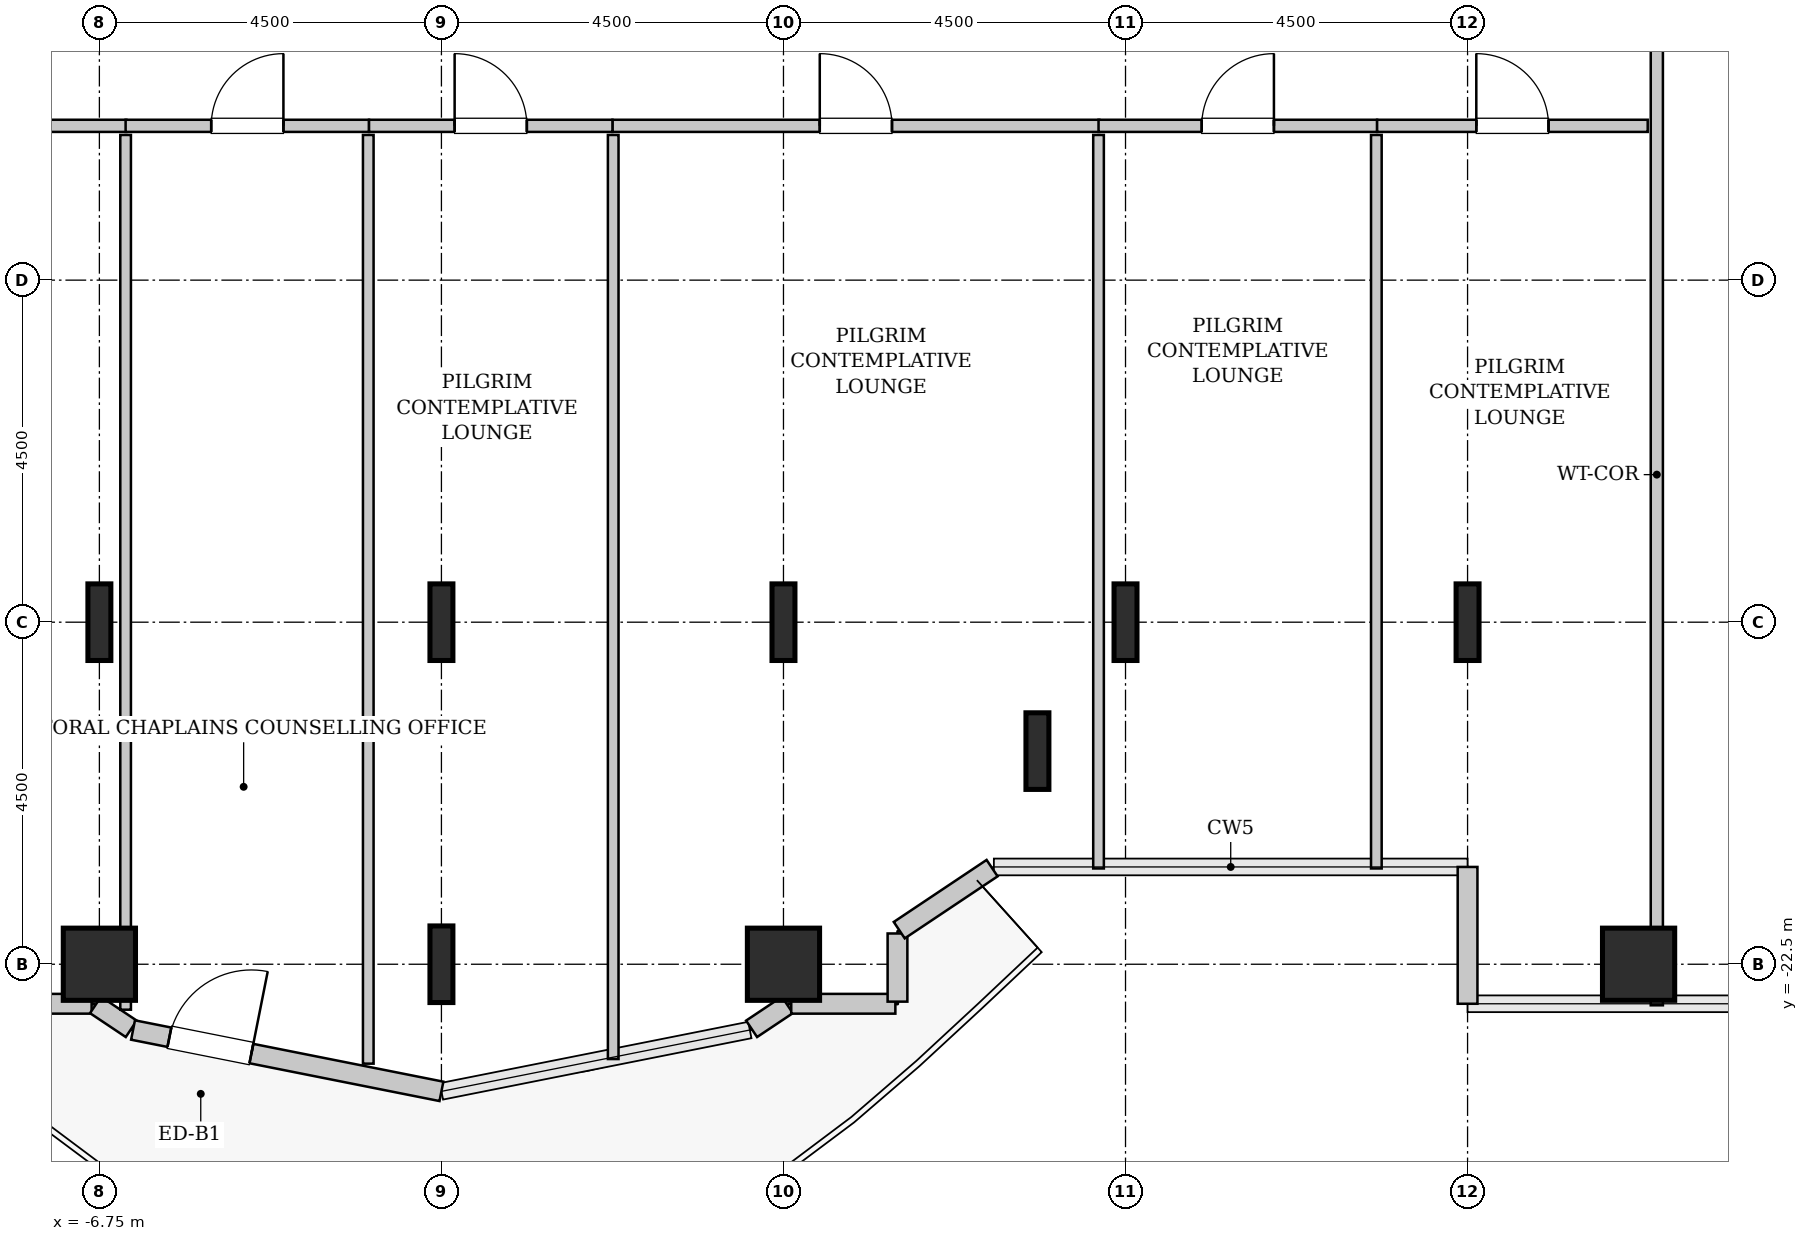
"""IFC4 building model, lengths in metres.
Left out: names, types, materials, properties, quantities, classifications, styles, units other than length and angle.
Written with IfcOpenShell. Run it as: python <this file> out.ifc"""

import sys

from ifc_helpers import new_model, si_unit, direction, frame, frame_2d, origin, origin_2d, place, context, subcontext, project, spatial, rectangle, hollow_rectangle, i_section, extrude, source, transform, mapped, element, fill, save


model = new_model("IFC4")
c1 = context("Model", 3, precision=1e-05, world=origin(), true_north=direction((0.0, 1.0)))
c2 = subcontext(c1, "Body", "Model", "MODEL_VIEW")
j1 = project(units=[si_unit("LENGTHUNIT", "METRE"), si_unit("PLANEANGLEUNIT", "RADIAN")], contexts=[c1])
p1 = place(None, origin())
s1 = spatial("IfcSite", under=j1, at=p1, CompositionType="ELEMENT")
p2 = place(p1, origin())
s2 = spatial("IfcBuilding", under=s1, at=p2, CompositionType="ELEMENT")
p3 = place(p2, frame((0.0, 0.0, 67.2)))
s3 = spatial("IfcBuildingStorey", under=s2, at=p3, CompositionType="ELEMENT", Elevation=67.2)
m1 = source(origin(), c2, "Body", "SweptSolid", [
    extrude(hollow_rectangle(XDim=0.95, YDim=0.95, WallThickness=0.045, InnerFilletRadius=0.045, OuterFilletRadius=0.09, at=origin_2d()), origin(), (0.0, 0.0, 1.0), 3.8),
])
p4 = place(p3, frame((-6.75, -22.5, 0.0), z_axis=(0.0, 0.0, 1.0), x_axis=(1.0, 0.0, 0.0)))
e1 = element("IfcColumn", 1, at=p4, inside=s3, PredefinedType="COLUMN", context=c2, shape_type="MappedRepresentation", body=[
    mapped(m1, transform((0.0, 0.0, 0.0), x_axis=(1.0, 0.0, 0.0), y_axis=(0.0, 1.0, 0.0), z_axis=(0.0, 0.0, 1.0), scale=1.0)),
])
m2 = source(origin(), c2, "Body", "SweptSolid", [
    extrude(i_section(OverallWidth=0.302, OverallDepth=1.008, WebThickness=0.021, FlangeThickness=0.04, FilletRadius=0.03, at=origin_2d()), origin(), (0.0, 0.0, 1.0), 3.8),
])
for number, where, z_axis, x_axis in (
    (2, (-6.75, -18.0, 0.0), (0.0, 0.0, 1.0), (1.0, 0.0, 0.0)),
    (3, (-2.25, -22.5, 0.0), (0.0, 0.0, 1.0), (1.0, 0.0, 0.0)),
    (4, (-2.25, -18.0, 0.0), (0.0, 0.0, 1.0), (1.0, 0.0, 0.0)),
):
    element("IfcColumn", number, at=place(p3, frame(where, z_axis=z_axis, x_axis=x_axis)), inside=s3, PredefinedType="COLUMN", context=c2, shape_type="MappedRepresentation", body=[
        mapped(m2, transform((0.0, 0.0, 0.0), x_axis=(1.0, 0.0, 0.0), y_axis=(0.0, 1.0, 0.0), z_axis=(0.0, 0.0, 1.0), scale=1.0)),
    ])
p5 = place(p3, frame((2.25, -22.5, 0.0), z_axis=(0.0, 0.0, 1.0), x_axis=(1.0, 0.0, 0.0)))
e5 = element("IfcColumn", 5, at=p5, inside=s3, PredefinedType="COLUMN", context=c2, shape_type="MappedRepresentation", body=[
    mapped(m1, transform((0.0, 0.0, 0.0), x_axis=(1.0, 0.0, 0.0), y_axis=(0.0, 1.0, 0.0), z_axis=(0.0, 0.0, 1.0), scale=1.0)),
])
for number, where, z_axis, x_axis in (
    (6, (2.25, -18.0, 0.0), (0.0, 0.0, 1.0), (1.0, 0.0, 0.0)),
    (7, (5.591, -19.696, 0.0), (0.0, 0.0, 1.0), (1.0, 0.0, 0.0)),
    (8, (6.75, -18.0, 0.0), (0.0, 0.0, 1.0), (1.0, 0.0, 0.0)),
    (9, (11.25, -18.0, 0.0), (0.0, 0.0, 1.0), (1.0, 0.0, 0.0)),
):
    element("IfcColumn", number, at=place(p3, frame(where, z_axis=z_axis, x_axis=x_axis)), inside=s3, PredefinedType="COLUMN", context=c2, shape_type="MappedRepresentation", body=[
        mapped(m2, transform((0.0, 0.0, 0.0), x_axis=(1.0, 0.0, 0.0), y_axis=(0.0, 1.0, 0.0), z_axis=(0.0, 0.0, 1.0), scale=1.0)),
    ])
p6 = place(p3, frame((13.5, -22.5, 0.0), z_axis=(0.0, 0.0, 1.0), x_axis=(1.0, 0.0, 0.0)))
e10 = element("IfcColumn", 10, at=p6, inside=s3, PredefinedType="COLUMN", context=c2, shape_type="MappedRepresentation", body=[
    mapped(m1, transform((0.0, 0.0, 0.0), x_axis=(1.0, 0.0, 0.0), y_axis=(0.0, 1.0, 0.0), z_axis=(0.0, 0.0, 1.0), scale=1.0)),
])
m3 = source(origin(), c2, "Body", "SweptSolid", [
    extrude(rectangle(XDim=1.8, YDim=0.26, at=frame_2d((0.9, 0.0))), origin(), (0.0, 0.0, 1.0), 3.55),
])
p7 = place(p3, frame((11.25, -21.22, 0.0), z_axis=(0.0, 0.0, 1.0), x_axis=(0.0, -1.0, 0.0)))
e11 = element("IfcWall", 11, at=p7, inside=s3, PredefinedType="SOLIDWALL", context=c2, shape_type="MappedRepresentation", body=[
    mapped(m3, transform((0.0, 0.0, 0.0), x_axis=(1.0, 0.0, 0.0), y_axis=(0.0, 1.0, 0.0), z_axis=(0.0, 0.0, 1.0), scale=1.0)),
])
m4 = source(origin(), c2, "Body", "SweptSolid", [
    extrude(rectangle(XDim=1.37, YDim=0.26, at=frame_2d((0.685, 0.0))), origin(), (0.0, 0.0, 1.0), 3.55),
])
p8 = place(p3, frame((-8.222, -23.02, 0.0), z_axis=(0.0, 0.0, 1.0), x_axis=(1.0, 0.0, 0.0)))
e12 = element("IfcWall", 12, at=p8, inside=s3, PredefinedType="SOLIDWALL", context=c2, shape_type="MappedRepresentation", body=[
    mapped(m4, transform((0.0, 0.0, 0.0), x_axis=(1.0, 0.0, 0.0), y_axis=(0.0, 1.0, 0.0), z_axis=(0.0, 0.0, 1.0), scale=1.0)),
])
m5 = source(origin(), c2, "Body", "SweptSolid", [
    extrude(rectangle(XDim=0.565, YDim=0.26, at=frame_2d((0.283, 0.0))), origin(), (0.0, 0.0, 1.0), 3.55),
])
p9 = place(p3, frame((-6.801, -23.036, 0.0), z_axis=(0.0, 0.0, 1.0), x_axis=(0.831651492666, -0.555297933317, 0.0)))
e13 = element("IfcWall", 13, at=p9, inside=s3, PredefinedType="SOLIDWALL", context=c2, shape_type="MappedRepresentation", body=[
    mapped(m5, transform((0.0, 0.0, 0.0), x_axis=(1.0, 0.0, 0.0), y_axis=(0.0, 1.0, 0.0), z_axis=(0.0, 0.0, 1.0), scale=1.0)),
])
m6 = source(origin(), c2, "Body", "SweptSolid", [
    extrude(rectangle(XDim=4.137, YDim=0.26, at=frame_2d((2.068, 0.0))), origin(), (0.0, 0.0, 1.0), 3.55),
])
p10 = place(p3, frame((-6.307, -23.365, 0.0), z_axis=(0.0, 0.0, 1.0), x_axis=(0.980782170794, -0.195105954428, 0.0)))
e14 = element("IfcWall", 14, at=p10, inside=s3, PredefinedType="SOLIDWALL", context=c2, shape_type="MappedRepresentation", body=[
    mapped(m6, transform((0.0, 0.0, 0.0), x_axis=(1.0, 0.0, 0.0), y_axis=(0.0, 1.0, 0.0), z_axis=(0.0, 0.0, 1.0), scale=1.0)),
])
p11 = place(p10, frame((0.488, 0.0, 0.0)))
e15 = element("IfcOpeningElement", 15, at=p11, cuts=e14, PredefinedType="OPENING", context=c2, shape_type="SweptSolid", body=[
    extrude(rectangle(XDim=1.1, YDim=2.2, at=frame_2d((0.55, 1.1))), frame((0.0, 0.14, 0.0), z_axis=(0.0, -1.0, 0.0), x_axis=(1.0, 0.0, 0.0)), (0.0, 0.0, 1.0), 0.28),
])
p12 = place(p3, frame((1.831, -23.35, 0.0), z_axis=(0.0, 0.0, 1.0), x_axis=(0.831651492666, 0.555297933317, 0.0)))
e16 = element("IfcWall", 16, at=p12, inside=s3, PredefinedType="SOLIDWALL", context=c2, shape_type="MappedRepresentation", body=[
    mapped(m5, transform((0.0, 0.0, 0.0), x_axis=(1.0, 0.0, 0.0), y_axis=(0.0, 1.0, 0.0), z_axis=(0.0, 0.0, 1.0), scale=1.0)),
])
p13 = place(p3, frame((2.352, -23.02, 0.0), z_axis=(0.0, 0.0, 1.0), x_axis=(1.0, 0.0, 0.0)))
e17 = element("IfcWall", 17, at=p13, inside=s3, PredefinedType="SOLIDWALL", context=c2, shape_type="MappedRepresentation", body=[
    mapped(m4, transform((0.0, 0.0, 0.0), x_axis=(1.0, 0.0, 0.0), y_axis=(0.0, 1.0, 0.0), z_axis=(0.0, 0.0, 1.0), scale=1.0)),
])
m7 = source(origin(), c2, "Body", "SweptSolid", [
    extrude(rectangle(XDim=0.897, YDim=0.26, at=frame_2d((0.448, 0.0))), origin(), (0.0, 0.0, 1.0), 3.55),
])
p14 = place(p3, frame((3.75, -22.992, 0.0), z_axis=(0.0, 0.0, 1.0), x_axis=(0.0, 1.0, 0.0)))
e18 = element("IfcWall", 18, at=p14, inside=s3, PredefinedType="SOLIDWALL", context=c2, shape_type="MappedRepresentation", body=[
    mapped(m7, transform((0.0, 0.0, 0.0), x_axis=(1.0, 0.0, 0.0), y_axis=(0.0, 1.0, 0.0), z_axis=(0.0, 0.0, 1.0), scale=1.0)),
])
m8 = source(origin(), c2, "Body", "SweptSolid", [
    extrude(rectangle(XDim=1.469, YDim=0.26, at=frame_2d((0.734, 0.0))), origin(), (0.0, 0.0, 1.0), 3.55),
])
p15 = place(p3, frame((3.773, -22.052, 0.0), z_axis=(0.0, 0.0, 1.0), x_axis=(0.831461760506, 0.555581983884, 0.0)))
e19 = element("IfcWall", 19, at=p15, inside=s3, PredefinedType="SOLIDWALL", context=c2, shape_type="MappedRepresentation", body=[
    mapped(m8, transform((0.0, 0.0, 0.0), x_axis=(1.0, 0.0, 0.0), y_axis=(0.0, 1.0, 0.0), z_axis=(0.0, 0.0, 1.0), scale=1.0)),
])
m9 = source(origin(), c2, "Body", "SweptSolid", [
    extrude(rectangle(XDim=17.245, YDim=0.16, at=frame_2d((8.623, 0.0))), origin(), (0.0, 0.0, 1.0), 3.535),
])
p16 = place(p3, frame((13.74, -23.04, 0.0), z_axis=(0.0, 0.0, 1.0), x_axis=(0.0, 1.0, 0.0)))
e20 = element("IfcWall", 20, at=p16, inside=s3, PredefinedType="PARTITIONING", context=c2, shape_type="MappedRepresentation", body=[
    mapped(m9, transform((0.0, 0.0, 0.0), x_axis=(1.0, 0.0, 0.0), y_axis=(0.0, 1.0, 0.0), z_axis=(0.0, 0.0, 1.0), scale=1.0)),
])
p17 = place(p16, frame((13.913, 0.0, 0.0)))
e21 = element("IfcOpeningElement", 21, at=p17, cuts=e20, PredefinedType="OPENING", context=c2, shape_type="SweptSolid", body=[
    extrude(rectangle(XDim=0.95, YDim=2.1, at=frame_2d((0.475, 1.05))), frame((0.0, 0.09, 0.0), z_axis=(0.0, -1.0, 0.0), x_axis=(1.0, 0.0, 0.0)), (0.0, 0.0, 1.0), 0.18),
])
m10 = source(origin(), c2, "Body", "SweptSolid", [
    extrude(rectangle(XDim=7.225, YDim=0.16, at=frame_2d((3.613, 0.0))), origin(), (0.0, 0.0, 1.0), 3.535),
])
p18 = place(p3, frame((-13.62, -11.47, 0.0), z_axis=(0.0, 0.0, 1.0), x_axis=(1.0, 0.0, 0.0)))
e22 = element("IfcWall", 22, at=p18, inside=s3, PredefinedType="PARTITIONING", context=c2, shape_type="MappedRepresentation", body=[
    mapped(m10, transform((0.0, 0.0, 0.0), x_axis=(1.0, 0.0, 0.0), y_axis=(0.0, 1.0, 0.0), z_axis=(0.0, 0.0, 1.0), scale=1.0)),
])
p19 = place(p18, frame((3.137, 0.0, 0.0)))
e23 = element("IfcOpeningElement", 23, at=p19, cuts=e22, PredefinedType="OPENING", context=c2, shape_type="SweptSolid", body=[
    extrude(rectangle(XDim=0.95, YDim=2.1, at=frame_2d((0.475, 1.05))), frame((0.0, 0.09, 0.0), z_axis=(0.0, -1.0, 0.0), x_axis=(1.0, 0.0, 0.0)), (0.0, 0.0, 1.0), 0.18),
])
m11 = source(origin(), c2, "Body", "SweptSolid", [
    extrude(rectangle(XDim=11.508, YDim=0.14, at=frame_2d((5.754, 0.0))), origin(), (0.0, 0.0, 1.0), 2.825),
])
p20 = place(p3, frame((-6.405, -23.098, 0.0), z_axis=(0.0, 0.0, 1.0), x_axis=(0.0, 1.0, 0.0)))
e24 = element("IfcWall", 24, at=p20, inside=s3, PredefinedType="PARTITIONING", context=c2, shape_type="MappedRepresentation", body=[
    mapped(m11, transform((0.0, 0.0, 0.0), x_axis=(1.0, 0.0, 0.0), y_axis=(0.0, 1.0, 0.0), z_axis=(0.0, 0.0, 1.0), scale=1.0)),
])
m12 = source(origin(), c2, "Body", "SweptSolid", [
    extrude(rectangle(XDim=6.405, YDim=0.16, at=frame_2d((3.203, 0.0))), origin(), (0.0, 0.0, 1.0), 3.535),
])
p21 = place(p3, frame((0.0, -11.47, 0.0), z_axis=(0.0, 0.0, 1.0), x_axis=(1.0, 0.0, 0.0)))
e25 = element("IfcWall", 25, at=p21, inside=s3, PredefinedType="PARTITIONING", context=c2, shape_type="MappedRepresentation", body=[
    mapped(m12, transform((0.0, 0.0, 0.0), x_axis=(1.0, 0.0, 0.0), y_axis=(0.0, 1.0, 0.0), z_axis=(0.0, 0.0, 1.0), scale=1.0)),
])
p22 = place(p21, frame((2.728, 0.0, 0.0)))
e26 = element("IfcOpeningElement", 26, at=p22, cuts=e25, PredefinedType="OPENING", context=c2, shape_type="SweptSolid", body=[
    extrude(rectangle(XDim=0.95, YDim=2.1, at=frame_2d((0.475, 1.05))), frame((0.0, 0.09, 0.0), z_axis=(0.0, -1.0, 0.0), x_axis=(1.0, 0.0, 0.0)), (0.0, 0.0, 1.0), 0.18),
])
m13 = source(origin(), c2, "Body", "SweptSolid", [
    extrude(rectangle(XDim=12.157, YDim=0.14, at=frame_2d((6.079, 0.0))), origin(), (0.0, 0.0, 1.0), 3.535),
])
p23 = place(p3, frame((0.01, -23.747, 0.0), z_axis=(0.0, 0.0, 1.0), x_axis=(0.0, 1.0, 0.0)))
e27 = element("IfcWall", 27, at=p23, inside=s3, PredefinedType="PARTITIONING", context=c2, shape_type="MappedRepresentation", body=[
    mapped(m13, transform((0.0, 0.0, 0.0), x_axis=(1.0, 0.0, 0.0), y_axis=(0.0, 1.0, 0.0), z_axis=(0.0, 0.0, 1.0), scale=1.0)),
])
m14 = source(origin(), c2, "Body", "SweptSolid", [
    extrude(rectangle(XDim=9.65, YDim=0.14, at=frame_2d((4.825, 0.0))), origin(), (0.0, 0.0, 1.0), 3.535),
])
p24 = place(p3, frame((6.395, -21.24, 0.0), z_axis=(0.0, 0.0, 1.0), x_axis=(0.0, 1.0, 0.0)))
e28 = element("IfcWall", 28, at=p24, inside=s3, PredefinedType="PARTITIONING", context=c2, shape_type="MappedRepresentation", body=[
    mapped(m14, transform((0.0, 0.0, 0.0), x_axis=(1.0, 0.0, 0.0), y_axis=(0.0, 1.0, 0.0), z_axis=(0.0, 0.0, 1.0), scale=1.0)),
])
m15 = source(origin(), c2, "Body", "SweptSolid", [
    extrude(rectangle(XDim=3.203, YDim=0.16, at=frame_2d((1.601, 0.0))), origin(), (0.0, 0.0, 1.0), 3.535),
])
p25 = place(p3, frame((-6.405, -11.47, 0.0), z_axis=(0.0, 0.0, 1.0), x_axis=(1.0, 0.0, 0.0)))
e29 = element("IfcWall", 29, at=p25, inside=s3, PredefinedType="PARTITIONING", context=c2, shape_type="MappedRepresentation", body=[
    mapped(m15, transform((0.0, 0.0, 0.0), x_axis=(1.0, 0.0, 0.0), y_axis=(0.0, 1.0, 0.0), z_axis=(0.0, 0.0, 1.0), scale=1.0)),
])
p26 = place(p25, frame((1.126, 0.0, 0.0)))
e30 = element("IfcOpeningElement", 30, at=p26, cuts=e29, PredefinedType="OPENING", context=c2, shape_type="SweptSolid", body=[
    extrude(rectangle(XDim=0.95, YDim=2.1, at=frame_2d((0.475, 1.05))), frame((0.0, 0.09, 0.0), z_axis=(0.0, -1.0, 0.0), x_axis=(1.0, 0.0, 0.0)), (0.0, 0.0, 1.0), 0.18),
])
m16 = source(origin(), c2, "Body", "SweptSolid", [
    extrude(rectangle(XDim=12.218, YDim=0.14, at=frame_2d((6.109, 0.0))), origin(), (0.0, 0.0, 1.0), 3.535),
])
p27 = place(p3, frame((-3.212, -23.808, 0.0), z_axis=(0.0, 0.0, 1.0), x_axis=(0.0, 1.0, 0.0)))
e31 = element("IfcWall", 31, at=p27, inside=s3, PredefinedType="PARTITIONING", context=c2, shape_type="MappedRepresentation", body=[
    mapped(m16, transform((0.0, 0.0, 0.0), x_axis=(1.0, 0.0, 0.0), y_axis=(0.0, 1.0, 0.0), z_axis=(0.0, 0.0, 1.0), scale=1.0)),
])
m17 = source(origin(), c2, "Body", "SweptSolid", [
    extrude(rectangle(XDim=3.202, YDim=0.16, at=frame_2d((1.601, 0.0))), origin(), (0.0, 0.0, 1.0), 3.535),
])
p28 = place(p3, frame((-3.202, -11.47, 0.0), z_axis=(0.0, 0.0, 1.0), x_axis=(1.0, 0.0, 0.0)))
e32 = element("IfcWall", 32, at=p28, inside=s3, PredefinedType="PARTITIONING", context=c2, shape_type="MappedRepresentation", body=[
    mapped(m17, transform((0.0, 0.0, 0.0), x_axis=(1.0, 0.0, 0.0), y_axis=(0.0, 1.0, 0.0), z_axis=(0.0, 0.0, 1.0), scale=1.0)),
])
p29 = place(p28, frame((1.126, 0.0, 0.0)))
e33 = element("IfcOpeningElement", 33, at=p29, cuts=e32, PredefinedType="OPENING", context=c2, shape_type="SweptSolid", body=[
    extrude(rectangle(XDim=0.95, YDim=2.1, at=frame_2d((0.475, 1.05))), frame((0.0, 0.09, 0.0), z_axis=(0.0, -1.0, 0.0), x_axis=(1.0, 0.0, 0.0)), (0.0, 0.0, 1.0), 0.18),
])
m18 = source(origin(), c2, "Body", "SweptSolid", [
    extrude(rectangle(XDim=3.665, YDim=0.16, at=frame_2d((1.833, 0.0))), origin(), (0.0, 0.0, 1.0), 3.535),
])
p30 = place(p3, frame((6.395, -11.47, 0.0), z_axis=(0.0, 0.0, 1.0), x_axis=(1.0, 0.0, 0.0)))
e34 = element("IfcWall", 34, at=p30, inside=s3, PredefinedType="PARTITIONING", context=c2, shape_type="MappedRepresentation", body=[
    mapped(m18, transform((0.0, 0.0, 0.0), x_axis=(1.0, 0.0, 0.0), y_axis=(0.0, 1.0, 0.0), z_axis=(0.0, 0.0, 1.0), scale=1.0)),
])
p31 = place(p30, frame((1.357, 0.0, 0.0)))
e35 = element("IfcOpeningElement", 35, at=p31, cuts=e34, PredefinedType="OPENING", context=c2, shape_type="SweptSolid", body=[
    extrude(rectangle(XDim=0.95, YDim=2.1, at=frame_2d((0.475, 1.05))), frame((0.0, 0.09, 0.0), z_axis=(0.0, -1.0, 0.0), x_axis=(1.0, 0.0, 0.0)), (0.0, 0.0, 1.0), 0.18),
])
p32 = place(p3, frame((10.05, -21.24, 0.0), z_axis=(0.0, 0.0, 1.0), x_axis=(0.0, 1.0, 0.0)))
e36 = element("IfcWall", 36, at=p32, inside=s3, PredefinedType="PARTITIONING", context=c2, shape_type="MappedRepresentation", body=[
    mapped(m14, transform((0.0, 0.0, 0.0), x_axis=(1.0, 0.0, 0.0), y_axis=(0.0, 1.0, 0.0), z_axis=(0.0, 0.0, 1.0), scale=1.0)),
])
m19 = source(origin(), c2, "Body", "SweptSolid", [
    extrude(rectangle(XDim=3.56, YDim=0.16, at=frame_2d((1.78, 0.0))), origin(), (0.0, 0.0, 1.0), 3.535),
])
p33 = place(p3, frame((10.06, -11.47, 0.0), z_axis=(0.0, 0.0, 1.0), x_axis=(1.0, 0.0, 0.0)))
e37 = element("IfcWall", 37, at=p33, inside=s3, PredefinedType="PARTITIONING", context=c2, shape_type="MappedRepresentation", body=[
    mapped(m19, transform((0.0, 0.0, 0.0), x_axis=(1.0, 0.0, 0.0), y_axis=(0.0, 1.0, 0.0), z_axis=(0.0, 0.0, 1.0), scale=1.0)),
])
p34 = place(p33, frame((1.305, 0.0, 0.0)))
e38 = element("IfcOpeningElement", 38, at=p34, cuts=e37, PredefinedType="OPENING", context=c2, shape_type="SweptSolid", body=[
    extrude(rectangle(XDim=0.95, YDim=2.1, at=frame_2d((0.475, 1.05))), frame((0.0, 0.09, 0.0), z_axis=(0.0, -1.0, 0.0), x_axis=(1.0, 0.0, 0.0)), (0.0, 0.0, 1.0), 0.18),
])
m20 = source(origin(), c2, "Body", "SweptSolid", [
    extrude(rectangle(XDim=1.1, YDim=2.2, at=frame_2d((0.55, 1.1))), frame((0.0, 0.025, 0.0), z_axis=(0.0, -1.0, 0.0), x_axis=(1.0, 0.0, 0.0)), (0.0, 0.0, 1.0), 0.05),
])
p35 = place(p11, origin())
e39 = element("IfcDoor", 39, at=p35, inside=s3, OperationType="SINGLE_SWING_RIGHT", PredefinedType="DOOR", context=c2, shape_type="MappedRepresentation", body=[
    mapped(m20, transform((0.0, 0.0, 0.0), x_axis=(1.0, 0.0, 0.0), y_axis=(0.0, 1.0, 0.0), z_axis=(0.0, 0.0, 1.0), scale=1.0)),
])
fill(e15, e39)
m21 = source(origin(), c2, "Body", "SweptSolid", [
    extrude(rectangle(XDim=0.95, YDim=2.1, at=frame_2d((0.475, 1.05))), frame((0.0, 0.025, 0.0), z_axis=(0.0, -1.0, 0.0), x_axis=(1.0, 0.0, 0.0)), (0.0, 0.0, 1.0), 0.05),
])
p36 = place(p22, origin())
e40 = element("IfcDoor", 40, at=p36, inside=s3, OperationType="SINGLE_SWING_LEFT", PredefinedType="DOOR", context=c2, shape_type="MappedRepresentation", body=[
    mapped(m21, transform((0.0, 0.0, 0.0), x_axis=(1.0, 0.0, 0.0), y_axis=(0.0, 1.0, 0.0), z_axis=(0.0, 0.0, 1.0), scale=1.0)),
])
fill(e26, e40)
p37 = place(p26, origin())
e41 = element("IfcDoor", 41, at=p37, inside=s3, OperationType="SINGLE_SWING_RIGHT", PredefinedType="DOOR", context=c2, shape_type="MappedRepresentation", body=[
    mapped(m21, transform((0.0, 0.0, 0.0), x_axis=(1.0, 0.0, 0.0), y_axis=(0.0, 1.0, 0.0), z_axis=(0.0, 0.0, 1.0), scale=1.0)),
])
fill(e30, e41)
p38 = place(p29, origin())
e42 = element("IfcDoor", 42, at=p38, inside=s3, OperationType="SINGLE_SWING_LEFT", PredefinedType="DOOR", context=c2, shape_type="MappedRepresentation", body=[
    mapped(m21, transform((0.0, 0.0, 0.0), x_axis=(1.0, 0.0, 0.0), y_axis=(0.0, 1.0, 0.0), z_axis=(0.0, 0.0, 1.0), scale=1.0)),
])
fill(e33, e42)
p39 = place(p31, origin())
e43 = element("IfcDoor", 43, at=p39, inside=s3, OperationType="SINGLE_SWING_RIGHT", PredefinedType="DOOR", context=c2, shape_type="MappedRepresentation", body=[
    mapped(m21, transform((0.0, 0.0, 0.0), x_axis=(1.0, 0.0, 0.0), y_axis=(0.0, 1.0, 0.0), z_axis=(0.0, 0.0, 1.0), scale=1.0)),
])
fill(e35, e43)
p40 = place(p34, origin())
e44 = element("IfcDoor", 44, at=p40, inside=s3, OperationType="SINGLE_SWING_LEFT", PredefinedType="DOOR", context=c2, shape_type="MappedRepresentation", body=[
    mapped(m21, transform((0.0, 0.0, 0.0), x_axis=(1.0, 0.0, 0.0), y_axis=(0.0, 1.0, 0.0), z_axis=(0.0, 0.0, 1.0), scale=1.0)),
])
fill(e38, e44)
save(model, sys.argv[1])
